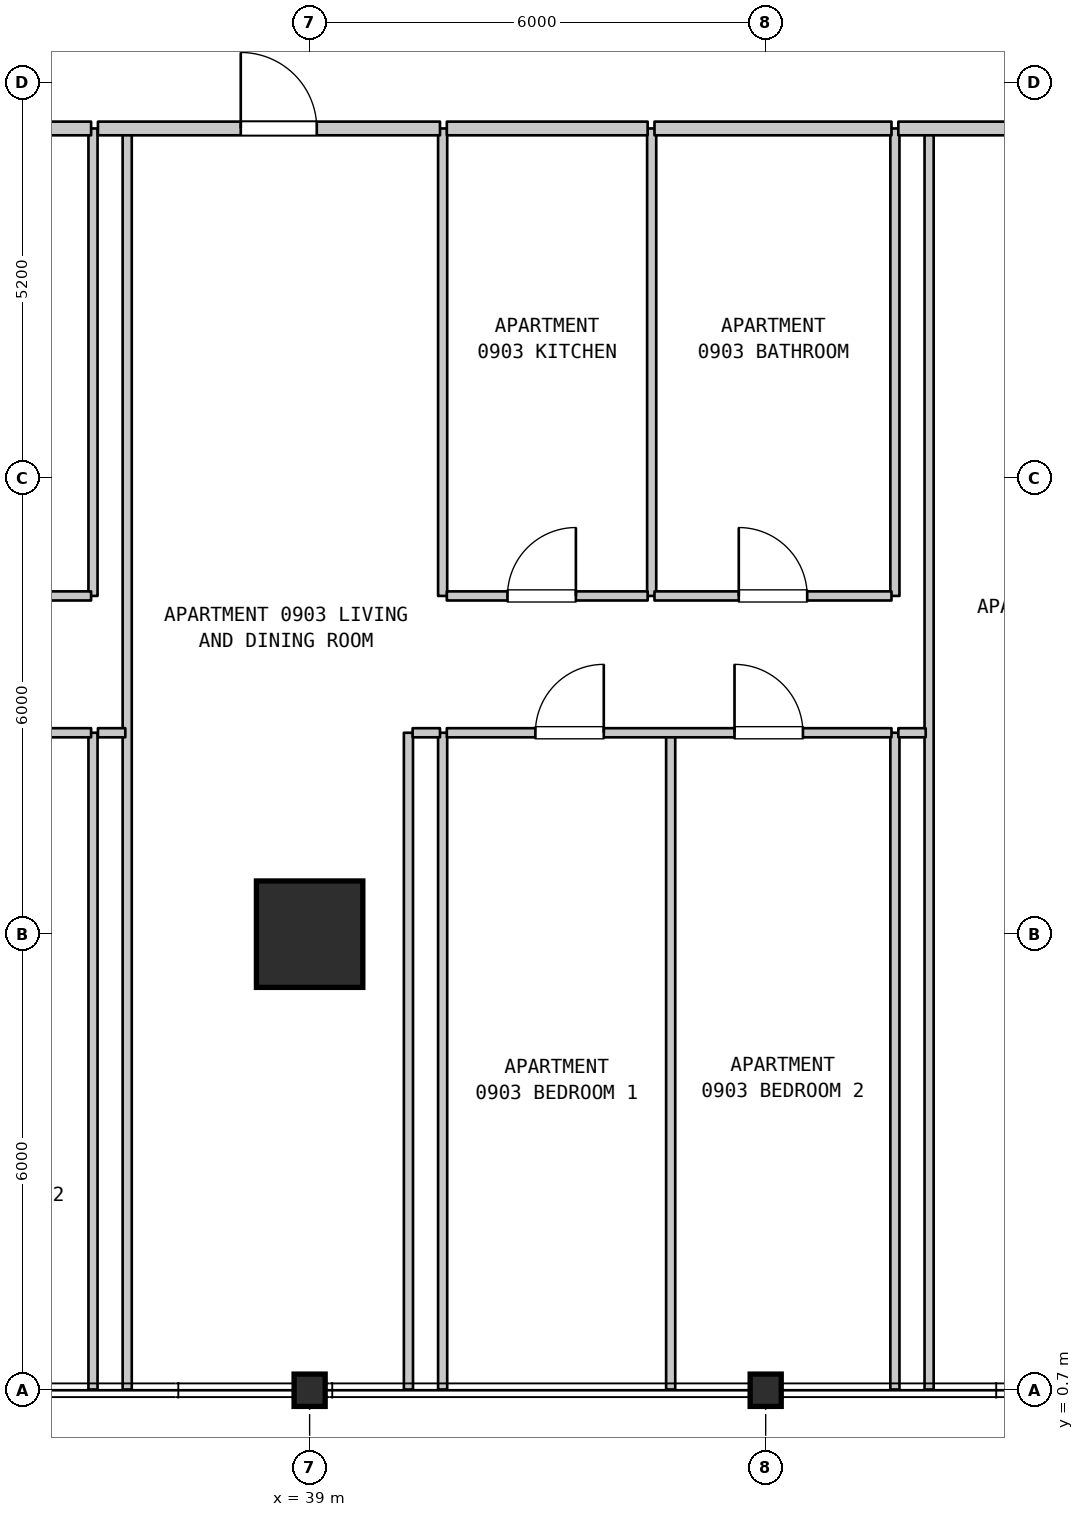
"""IFC4 building model, lengths in metres.
Left out: names, types, materials, properties, quantities, classifications, styles, units other than length and angle.
Written with IfcOpenShell. Run it as: python <this file> out.ifc"""

import sys

from ifc_helpers import new_model, si_unit, direction, frame, frame_2d, origin, origin_2d, place, context, subcontext, project, spatial, rectangle, i_section, extrude, element, fill, save


model = new_model("IFC4")
c1 = context("Model", 3, precision=1e-05, world=origin(), true_north=direction((0.0, 1.0)))
c2 = subcontext(c1, "Body", "Model", "MODEL_VIEW")
j1 = project(units=[si_unit("LENGTHUNIT", "METRE"), si_unit("PLANEANGLEUNIT", "RADIAN")], contexts=[c1])
p1 = place(None, origin())
s1 = spatial("IfcSite", under=j1, at=p1, CompositionType="ELEMENT")
p2 = place(p1, origin())
s2 = spatial("IfcBuilding", under=s1, at=p2, CompositionType="ELEMENT")
p3 = place(p2, frame((0.0, 0.0, 42.5)))
s3 = spatial("IfcBuildingStorey", under=s2, at=p3, CompositionType="ELEMENT", Elevation=42.5)
p4 = place(p3, frame((39.0, 0.7, 0.0), z_axis=(0.0, 0.0, 1.0), x_axis=(1.0, 0.0, 0.0)))
e1 = element("IfcColumn", 1, at=p4, inside=s3, PredefinedType="COLUMN", context=c2, shape_type="SweptSolid", body=[
    extrude(i_section(OverallWidth=0.409, OverallDepth=0.425, WebThickness=0.032, FlangeThickness=0.052, FilletRadius=0.015, at=origin_2d()), origin(), (0.0, 0.0, 1.0), 3.7),
])
p5 = place(p3, frame((39.0, 6.7, 0.0), z_axis=(0.0, 0.0, 1.0), x_axis=(1.0, 0.0, 0.0)))
e2 = element("IfcColumn", 2, at=p5, inside=s3, PredefinedType="COLUMN", context=c2, shape_type="SweptSolid", body=[
    extrude(rectangle(XDim=1.4, YDim=1.4, at=origin_2d()), origin(), (0.0, 0.0, 1.0), 3.7),
])
p6 = place(p3, frame((45.0, 0.7, 0.0), z_axis=(0.0, 0.0, 1.0), x_axis=(1.0, 0.0, 0.0)))
e3 = element("IfcColumn", 3, at=p6, inside=s3, PredefinedType="COLUMN", context=c2, shape_type="SweptSolid", body=[
    extrude(i_section(OverallWidth=0.409, OverallDepth=0.425, WebThickness=0.032, FlangeThickness=0.052, FilletRadius=0.015, at=origin_2d()), origin(), (0.0, 0.0, 1.0), 3.7),
])
p7 = place(p3, frame((36.15, 0.71, 0.0), z_axis=(0.0, 0.0, 1.0), x_axis=(0.0, 1.0, 0.0)))
e4 = element("IfcWall", 4, at=p7, inside=s3, PredefinedType="PARTITIONING", context=c2, shape_type="SweptSolid", body=[
    extrude(rectangle(XDim=8.64, YDim=0.12, at=frame_2d((4.32, 0.0))), origin(), (0.0, 0.0, 1.0), 3.385),
])
p8 = place(p3, frame((36.15, 11.15, 0.0), z_axis=(0.0, 0.0, 1.0), x_axis=(0.0, 1.0, 0.0)))
e5 = element("IfcWall", 5, at=p8, inside=s3, PredefinedType="PARTITIONING", context=c2, shape_type="SweptSolid", body=[
    extrude(rectangle(XDim=6.15, YDim=0.12, at=frame_2d((3.075, 0.0))), origin(), (0.0, 0.0, 1.0), 3.385),
])
p9 = place(p3, frame((36.6, 0.71, 0.0), z_axis=(0.0, 0.0, 1.0), x_axis=(0.0, 1.0, 0.0)))
e6 = element("IfcWall", 6, at=p9, inside=s3, PredefinedType="PARTITIONING", context=c2, shape_type="SweptSolid", body=[
    extrude(rectangle(XDim=16.59, YDim=0.12, at=frame_2d((8.295, 0.0))), origin(), (0.0, 0.0, 1.0), 3.385),
])
for number, where, z_axis, x_axis in (
    (7, (40.3, 0.71, 0.0), (0.0, 0.0, 1.0), (0.0, 1.0, 0.0)),
    (8, (40.75, 0.71, 0.0), (0.0, 0.0, 1.0), (0.0, 1.0, 0.0)),
):
    element("IfcWall", number, at=place(p3, frame(where, z_axis=z_axis, x_axis=x_axis)), inside=s3, PredefinedType="PARTITIONING", context=c2, shape_type="SweptSolid", body=[
        extrude(rectangle(XDim=8.64, YDim=0.12, at=frame_2d((4.32, 0.0))), origin(), (0.0, 0.0, 1.0), 3.385),
    ])
for number, where, z_axis, x_axis in (
    (9, (40.75, 11.15, 0.0), (0.0, 0.0, 1.0), (0.0, 1.0, 0.0)),
    (10, (43.5, 11.15, 0.0), (0.0, 0.0, 1.0), (0.0, 1.0, 0.0)),
):
    element("IfcWall", number, at=place(p3, frame(where, z_axis=z_axis, x_axis=x_axis)), inside=s3, PredefinedType="PARTITIONING", context=c2, shape_type="SweptSolid", body=[
        extrude(rectangle(XDim=6.15, YDim=0.12, at=frame_2d((3.075, 0.0))), origin(), (0.0, 0.0, 1.0), 3.385),
    ])
for number, where, z_axis, x_axis in (
    (11, (43.75, 0.71, 0.0), (0.0, 0.0, 1.0), (0.0, 1.0, 0.0)),
    (12, (46.7, 0.71, 0.0), (0.0, 0.0, 1.0), (0.0, 1.0, 0.0)),
):
    element("IfcWall", number, at=place(p3, frame(where, z_axis=z_axis, x_axis=x_axis)), inside=s3, PredefinedType="PARTITIONING", context=c2, shape_type="SweptSolid", body=[
        extrude(rectangle(XDim=8.64, YDim=0.12, at=frame_2d((4.32, 0.0))), origin(), (0.0, 0.0, 1.0), 3.385),
    ])
p10 = place(p3, frame((46.7, 11.15, 0.0), z_axis=(0.0, 0.0, 1.0), x_axis=(0.0, 1.0, 0.0)))
e13 = element("IfcWall", 13, at=p10, inside=s3, PredefinedType="PARTITIONING", context=c2, shape_type="SweptSolid", body=[
    extrude(rectangle(XDim=6.15, YDim=0.12, at=frame_2d((3.075, 0.0))), origin(), (0.0, 0.0, 1.0), 3.385),
])
p11 = place(p3, frame((47.15, 0.71, 0.0), z_axis=(0.0, 0.0, 1.0), x_axis=(0.0, 1.0, 0.0)))
e14 = element("IfcWall", 14, at=p11, inside=s3, PredefinedType="PARTITIONING", context=c2, shape_type="SweptSolid", body=[
    extrude(rectangle(XDim=16.59, YDim=0.12, at=frame_2d((8.295, 0.0))), origin(), (0.0, 0.0, 1.0), 3.385),
])
p12 = place(p3, frame((30.345, 9.35, 0.0), z_axis=(0.0, 0.0, 1.0), x_axis=(1.0, 0.0, 0.0)))
e15 = element("IfcWall", 15, at=p12, inside=s3, PredefinedType="PARTITIONING", context=c2, shape_type="SweptSolid", body=[
    extrude(rectangle(XDim=5.78, YDim=0.12, at=frame_2d((2.89, 0.0))), origin(), (0.0, 0.0, 1.0), 3.385),
])
p13 = place(p12, frame((1.147, 0.0, 0.0)))
e16 = element("IfcOpeningElement", 16, at=p13, cuts=e15, PredefinedType="OPENING", context=c2, shape_type="SweptSolid", body=[
    extrude(rectangle(XDim=0.9, YDim=2.15, at=frame_2d((0.45, 1.075))), frame((0.0, 0.07, 0.0), z_axis=(0.0, -1.0, 0.0), x_axis=(1.0, 0.0, 0.0)), (0.0, 0.0, 1.0), 0.14),
])
p14 = place(p12, frame((3.733, 0.0, 0.0)))
e17 = element("IfcOpeningElement", 17, at=p14, cuts=e15, PredefinedType="OPENING", context=c2, shape_type="SweptSolid", body=[
    extrude(rectangle(XDim=0.9, YDim=2.15, at=frame_2d((0.45, 1.075))), frame((0.0, 0.07, 0.0), z_axis=(0.0, -1.0, 0.0), x_axis=(1.0, 0.0, 0.0)), (0.0, 0.0, 1.0), 0.14),
])
p15 = place(p3, frame((36.215, 9.35, 0.0), z_axis=(0.0, 0.0, 1.0), x_axis=(1.0, 0.0, 0.0)))
e18 = element("IfcWall", 18, at=p15, inside=s3, PredefinedType="PARTITIONING", context=c2, shape_type="SweptSolid", body=[
    extrude(rectangle(XDim=0.36, YDim=0.12, at=frame_2d((0.18, 0.0))), origin(), (0.0, 0.0, 1.0), 3.385),
])
p16 = place(p3, frame((40.355, 9.35, 0.0), z_axis=(0.0, 0.0, 1.0), x_axis=(1.0, 0.0, 0.0)))
e19 = element("IfcWall", 19, at=p16, inside=s3, PredefinedType="PARTITIONING", context=c2, shape_type="SweptSolid", body=[
    extrude(rectangle(XDim=0.36, YDim=0.12, at=frame_2d((0.18, 0.0))), origin(), (0.0, 0.0, 1.0), 3.385),
])
p17 = place(p3, frame((40.805, 9.35, 0.0), z_axis=(0.0, 0.0, 1.0), x_axis=(1.0, 0.0, 0.0)))
e20 = element("IfcWall", 20, at=p17, inside=s3, PredefinedType="PARTITIONING", context=c2, shape_type="SweptSolid", body=[
    extrude(rectangle(XDim=5.85, YDim=0.12, at=frame_2d((2.925, 0.0))), origin(), (0.0, 0.0, 1.0), 3.385),
])
p18 = place(p17, frame((1.165, 0.0, 0.0)))
e21 = element("IfcOpeningElement", 21, at=p18, cuts=e20, PredefinedType="OPENING", context=c2, shape_type="SweptSolid", body=[
    extrude(rectangle(XDim=0.9, YDim=2.15, at=frame_2d((0.45, 1.075))), frame((0.0, 0.07, 0.0), z_axis=(0.0, -1.0, 0.0), x_axis=(1.0, 0.0, 0.0)), (0.0, 0.0, 1.0), 0.14),
])
p19 = place(p17, frame((3.785, 0.0, 0.0)))
e22 = element("IfcOpeningElement", 22, at=p19, cuts=e20, PredefinedType="OPENING", context=c2, shape_type="SweptSolid", body=[
    extrude(rectangle(XDim=0.9, YDim=2.15, at=frame_2d((0.45, 1.075))), frame((0.0, 0.07, 0.0), z_axis=(0.0, -1.0, 0.0), x_axis=(1.0, 0.0, 0.0)), (0.0, 0.0, 1.0), 0.14),
])
p20 = place(p3, frame((46.745, 9.35, 0.0), z_axis=(0.0, 0.0, 1.0), x_axis=(1.0, 0.0, 0.0)))
e23 = element("IfcWall", 23, at=p20, inside=s3, PredefinedType="PARTITIONING", context=c2, shape_type="SweptSolid", body=[
    extrude(rectangle(XDim=0.36, YDim=0.12, at=frame_2d((0.18, 0.0))), origin(), (0.0, 0.0, 1.0), 3.385),
])
p21 = place(p3, frame((33.045, 11.15, 0.0), z_axis=(0.0, 0.0, 1.0), x_axis=(1.0, 0.0, 0.0)))
e24 = element("IfcWall", 24, at=p21, inside=s3, PredefinedType="PARTITIONING", context=c2, shape_type="SweptSolid", body=[
    extrude(rectangle(XDim=3.08, YDim=0.12, at=frame_2d((1.54, 0.0))), origin(), (0.0, 0.0, 1.0), 3.385),
])
p22 = place(p21, frame((1.09, 0.0, 0.0)))
e25 = element("IfcOpeningElement", 25, at=p22, cuts=e24, PredefinedType="OPENING", context=c2, shape_type="SweptSolid", body=[
    extrude(rectangle(XDim=0.9, YDim=2.1, at=frame_2d((0.45, 1.05))), frame((0.0, 0.07, 0.0), z_axis=(0.0, -1.0, 0.0), x_axis=(1.0, 0.0, 0.0)), (0.0, 0.0, 1.0), 0.14),
])
p23 = place(p3, frame((40.805, 11.15, 0.0), z_axis=(0.0, 0.0, 1.0), x_axis=(1.0, 0.0, 0.0)))
e26 = element("IfcWall", 26, at=p23, inside=s3, PredefinedType="PARTITIONING", context=c2, shape_type="SweptSolid", body=[
    extrude(rectangle(XDim=2.642, YDim=0.12, at=frame_2d((1.321, 0.0))), origin(), (0.0, 0.0, 1.0), 3.385),
])
p24 = place(p23, frame((0.798, 0.0, 0.0)))
e27 = element("IfcOpeningElement", 27, at=p24, cuts=e26, PredefinedType="OPENING", context=c2, shape_type="SweptSolid", body=[
    extrude(rectangle(XDim=0.9, YDim=2.15, at=frame_2d((0.45, 1.075))), frame((0.0, 0.07, 0.0), z_axis=(0.0, -1.0, 0.0), x_axis=(1.0, 0.0, 0.0)), (0.0, 0.0, 1.0), 0.14),
])
p25 = place(p3, frame((43.537, 11.15, 0.0), z_axis=(0.0, 0.0, 1.0), x_axis=(1.0, 0.0, 0.0)))
e28 = element("IfcWall", 28, at=p25, inside=s3, PredefinedType="PARTITIONING", context=c2, shape_type="SweptSolid", body=[
    extrude(rectangle(XDim=3.118, YDim=0.12, at=frame_2d((1.559, 0.0))), origin(), (0.0, 0.0, 1.0), 3.385),
])
p26 = place(p25, frame((1.109, 0.0, 0.0)))
e29 = element("IfcOpeningElement", 29, at=p26, cuts=e28, PredefinedType="OPENING", context=c2, shape_type="SweptSolid", body=[
    extrude(rectangle(XDim=0.9, YDim=2.1, at=frame_2d((0.45, 1.05))), frame((0.0, 0.07, 0.0), z_axis=(0.0, -1.0, 0.0), x_axis=(1.0, 0.0, 0.0)), (0.0, 0.0, 1.0), 0.14),
])
p27 = place(p3, frame((33.045, 17.3, 0.0), z_axis=(0.0, 0.0, 1.0), x_axis=(1.0, 0.0, 0.0)))
e30 = element("IfcWall", 30, at=p27, inside=s3, PredefinedType="STANDARD", context=c2, shape_type="SweptSolid", body=[
    extrude(rectangle(XDim=3.08, YDim=0.18, at=frame_2d((1.54, 0.0))), origin(), (0.0, 0.0, 1.0), 3.385),
])
p28 = place(p3, frame((36.215, 17.3, 0.0), z_axis=(0.0, 0.0, 1.0), x_axis=(1.0, 0.0, 0.0)))
e31 = element("IfcWall", 31, at=p28, inside=s3, PredefinedType="STANDARD", context=c2, shape_type="SweptSolid", body=[
    extrude(rectangle(XDim=4.5, YDim=0.18, at=frame_2d((2.25, 0.0))), origin(), (0.0, 0.0, 1.0), 3.385),
])
p29 = place(p28, frame((1.879, 0.0, 0.0)))
e32 = element("IfcOpeningElement", 32, at=p29, cuts=e31, PredefinedType="OPENING", context=c2, shape_type="SweptSolid", body=[
    extrude(rectangle(XDim=1.0, YDim=2.15, at=frame_2d((0.5, 1.075))), frame((0.0, 0.1, 0.0), z_axis=(0.0, -1.0, 0.0), x_axis=(1.0, 0.0, 0.0)), (0.0, 0.0, 1.0), 0.2),
])
p30 = place(p3, frame((40.805, 17.3, 0.0), z_axis=(0.0, 0.0, 1.0), x_axis=(1.0, 0.0, 0.0)))
e33 = element("IfcWall", 33, at=p30, inside=s3, PredefinedType="STANDARD", context=c2, shape_type="SweptSolid", body=[
    extrude(rectangle(XDim=2.642, YDim=0.18, at=frame_2d((1.321, 0.0))), origin(), (0.0, 0.0, 1.0), 3.385),
])
p31 = place(p3, frame((43.537, 17.3, 0.0), z_axis=(0.0, 0.0, 1.0), x_axis=(1.0, 0.0, 0.0)))
e34 = element("IfcWall", 34, at=p31, inside=s3, PredefinedType="STANDARD", context=c2, shape_type="SweptSolid", body=[
    extrude(rectangle(XDim=3.118, YDim=0.18, at=frame_2d((1.559, 0.0))), origin(), (0.0, 0.0, 1.0), 3.385),
])
p32 = place(p3, frame((46.745, 17.3, 0.0), z_axis=(0.0, 0.0, 1.0), x_axis=(1.0, 0.0, 0.0)))
e35 = element("IfcWall", 35, at=p32, inside=s3, PredefinedType="STANDARD", context=c2, shape_type="SweptSolid", body=[
    extrude(rectangle(XDim=4.8, YDim=0.18, at=frame_2d((2.4, 0.0))), origin(), (0.0, 0.0, 1.0), 3.385),
])
p33 = place(p32, frame((1.9, 0.0, 0.0)))
e36 = element("IfcOpeningElement", 36, at=p33, cuts=e35, PredefinedType="OPENING", context=c2, shape_type="SweptSolid", body=[
    extrude(rectangle(XDim=1.0, YDim=2.15, at=frame_2d((0.5, 1.075))), frame((0.0, 0.1, 0.0), z_axis=(0.0, -1.0, 0.0), x_axis=(1.0, 0.0, 0.0)), (0.0, 0.0, 1.0), 0.2),
])
p34 = place(p18, origin())
e37 = element("IfcDoor", 37, at=p34, inside=s3, OperationType="SINGLE_SWING_RIGHT", PredefinedType="DOOR", context=c2, shape_type="SweptSolid", body=[
    extrude(rectangle(XDim=0.9, YDim=2.15, at=frame_2d((0.45, 1.075))), frame((0.0, 0.025, 0.0), z_axis=(0.0, -1.0, 0.0), x_axis=(1.0, 0.0, 0.0)), (0.0, 0.0, 1.0), 0.05),
])
fill(e21, e37)
p35 = place(p19, origin())
e38 = element("IfcDoor", 38, at=p35, inside=s3, OperationType="SINGLE_SWING_LEFT", PredefinedType="DOOR", context=c2, shape_type="SweptSolid", body=[
    extrude(rectangle(XDim=0.9, YDim=2.15, at=frame_2d((0.45, 1.075))), frame((0.0, 0.025, 0.0), z_axis=(0.0, -1.0, 0.0), x_axis=(1.0, 0.0, 0.0)), (0.0, 0.0, 1.0), 0.05),
])
fill(e22, e38)
p36 = place(p24, origin())
e39 = element("IfcDoor", 39, at=p36, inside=s3, OperationType="SINGLE_SWING_RIGHT", PredefinedType="DOOR", context=c2, shape_type="SweptSolid", body=[
    extrude(rectangle(XDim=0.9, YDim=2.15, at=frame_2d((0.45, 1.075))), frame((0.0, 0.025, 0.0), z_axis=(0.0, -1.0, 0.0), x_axis=(1.0, 0.0, 0.0)), (0.0, 0.0, 1.0), 0.05),
])
fill(e27, e39)
p37 = place(p26, origin())
e40 = element("IfcDoor", 40, at=p37, inside=s3, OperationType="SINGLE_SWING_LEFT", PredefinedType="DOOR", context=c2, shape_type="SweptSolid", body=[
    extrude(rectangle(XDim=0.9, YDim=2.1, at=frame_2d((0.45, 1.05))), frame((0.0, 0.025, 0.0), z_axis=(0.0, -1.0, 0.0), x_axis=(1.0, 0.0, 0.0)), (0.0, 0.0, 1.0), 0.05),
])
fill(e29, e40)
p38 = place(p29, origin())
e41 = element("IfcDoor", 41, at=p38, inside=s3, OperationType="SINGLE_SWING_LEFT", PredefinedType="DOOR", context=c2, shape_type="SweptSolid", body=[
    extrude(rectangle(XDim=1.0, YDim=2.15, at=frame_2d((0.5, 1.075))), frame((0.0, 0.025, 0.0), z_axis=(0.0, -1.0, 0.0), x_axis=(1.0, 0.0, 0.0)), (0.0, 0.0, 1.0), 0.05),
])
fill(e32, e41)
save(model, sys.argv[1])
